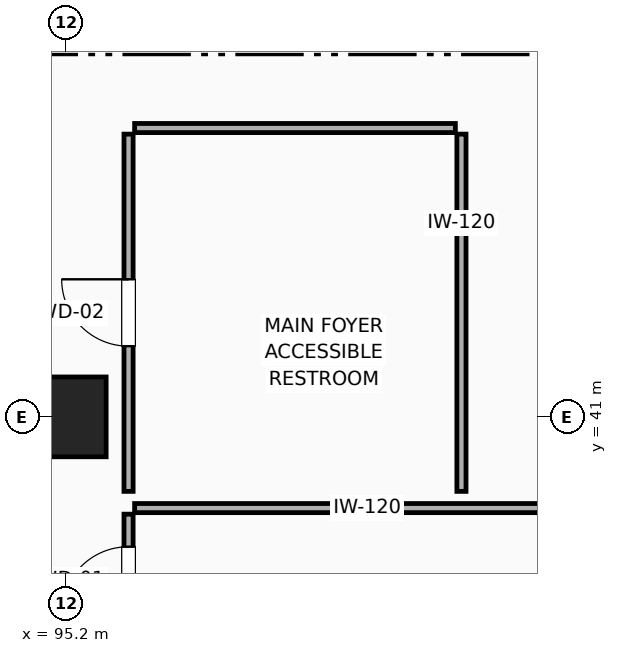
"""IFC4 building model, lengths in metres.
Left out: names, types, materials, properties, quantities, classifications, styles, units other than length and angle.
Written with IfcOpenShell. Run it as: python <this file> out.ifc"""

import sys

from ifc_helpers import new_model, si_unit, direction, frame, frame_2d, origin, origin_2d, place, context, subcontext, project, spatial, rectangle, extrude, element, fill, save


model = new_model("IFC4")
c1 = context("Model", 3, precision=1e-05, world=origin(), true_north=direction((0.0, 1.0)))
c2 = subcontext(c1, "Body", "Model", "MODEL_VIEW")
j1 = project(units=[si_unit("LENGTHUNIT", "METRE"), si_unit("PLANEANGLEUNIT", "RADIAN")], contexts=[c1])
p1 = place(None, origin())
s1 = spatial("IfcSite", under=j1, at=p1, CompositionType="ELEMENT")
p2 = place(p1, origin())
s2 = spatial("IfcBuilding", under=s1, at=p2, CompositionType="ELEMENT")
p3 = place(p2, origin())
s3 = spatial("IfcBuildingStorey", under=s2, at=p3, CompositionType="ELEMENT", Elevation=0.0)
p4 = place(p3, frame((95.2, 41.0, 0.0), z_axis=(0.0, 0.0, 1.0), x_axis=(1.0, 0.0, 0.0)))
e1 = element("IfcColumn", 1, at=p4, inside=s3, PredefinedType="COLUMN", context=c2, shape_type="SweptSolid", body=[
    extrude(rectangle(XDim=1.05, YDim=1.05, at=origin_2d()), origin(), (0.0, 0.0, 1.0), 5.4),
])
p5 = place(p3, frame((96.02, 37.985, 0.0), z_axis=(0.0, 0.0, 1.0), x_axis=(0.0, 1.0, 0.0)))
e2 = element("IfcWall", 2, at=p5, inside=s3, PredefinedType="PARTITIONING", context=c2, shape_type="SweptSolid", body=[
    extrude(rectangle(XDim=1.735, YDim=0.12, at=frame_2d((0.867, 0.0))), origin(), (0.0, 0.0, 1.0), 5.11),
])
p6 = place(p5, frame((0.427, 0.0, 0.0)))
e3 = element("IfcOpeningElement", 3, at=p6, cuts=e2, PredefinedType="OPENING", context=c2, shape_type="SweptSolid", body=[
    extrude(rectangle(XDim=0.88, YDim=2.1, at=frame_2d((0.44, 1.05))), frame((0.0, 0.07, 0.0), z_axis=(0.0, -1.0, 0.0), x_axis=(1.0, 0.0, 0.0)), (0.0, 0.0, 1.0), 0.14),
])
p7 = place(p3, frame((96.1, 39.8, 0.0), z_axis=(0.0, 0.0, 1.0), x_axis=(1.0, 0.0, 0.0)))
e4 = element("IfcWall", 4, at=p7, inside=s3, PredefinedType="PARTITIONING", context=c2, shape_type="SweptSolid", body=[
    extrude(rectangle(XDim=6.12, YDim=0.12, at=frame_2d((3.06, 0.0))), origin(), (0.0, 0.0, 1.0), 5.11),
])
p8 = place(p3, frame((100.4, 44.72, 0.0), z_axis=(0.0, 0.0, 1.0), x_axis=(0.0, -1.0, 0.0)))
e5 = element("IfcWall", 5, at=p8, inside=s3, PredefinedType="PARTITIONING", context=c2, shape_type="SweptSolid", body=[
    extrude(rectangle(XDim=4.7, YDim=0.12, at=frame_2d((2.35, 0.0))), origin(), (0.0, 0.0, 1.0), 4.75),
])
p9 = place(p3, frame((96.02, 40.02, 0.0), z_axis=(0.0, 0.0, 1.0), x_axis=(0.0, 1.0, 0.0)))
e6 = element("IfcWall", 6, at=p9, inside=s3, PredefinedType="PARTITIONING", context=c2, shape_type="SweptSolid", body=[
    extrude(rectangle(XDim=4.7, YDim=0.12, at=frame_2d((2.35, 0.0))), origin(), (0.0, 0.0, 1.0), 5.11),
])
p10 = place(p9, frame((1.91, 0.0, 0.0)))
e7 = element("IfcOpeningElement", 7, at=p10, cuts=e6, PredefinedType="OPENING", context=c2, shape_type="SweptSolid", body=[
    extrude(rectangle(XDim=0.88, YDim=2.1, at=frame_2d((0.44, 1.05))), frame((0.0, 0.07, 0.0), z_axis=(0.0, -1.0, 0.0), x_axis=(1.0, 0.0, 0.0)), (0.0, 0.0, 1.0), 0.14),
])
p11 = place(p3, frame((96.1, 44.8, 0.0), z_axis=(0.0, 0.0, 1.0), x_axis=(1.0, 0.0, 0.0)))
e8 = element("IfcWall", 8, at=p11, inside=s3, PredefinedType="PARTITIONING", context=c2, shape_type="SweptSolid", body=[
    extrude(rectangle(XDim=4.22, YDim=0.12, at=frame_2d((2.11, 0.0))), origin(), (0.0, 0.0, 1.0), 5.11),
])
p12 = place(p6, origin())
e9 = element("IfcDoor", 9, at=p12, inside=s3, OperationType="SINGLE_SWING_LEFT", PredefinedType="DOOR", context=c2, shape_type="SweptSolid", body=[
    extrude(rectangle(XDim=0.88, YDim=2.1, at=frame_2d((0.44, 1.05))), frame((0.0, 0.025, 0.0), z_axis=(0.0, -1.0, 0.0), x_axis=(1.0, 0.0, 0.0)), (0.0, 0.0, 1.0), 0.05),
])
fill(e3, e9)
p13 = place(p10, origin())
e10 = element("IfcDoor", 10, at=p13, inside=s3, OperationType="SINGLE_SWING_RIGHT", PredefinedType="DOOR", context=c2, shape_type="SweptSolid", body=[
    extrude(rectangle(XDim=0.88, YDim=2.1, at=frame_2d((0.44, 1.05))), frame((0.0, 0.025, 0.0), z_axis=(0.0, -1.0, 0.0), x_axis=(1.0, 0.0, 0.0)), (0.0, 0.0, 1.0), 0.05),
])
fill(e7, e10)
save(model, sys.argv[1])
